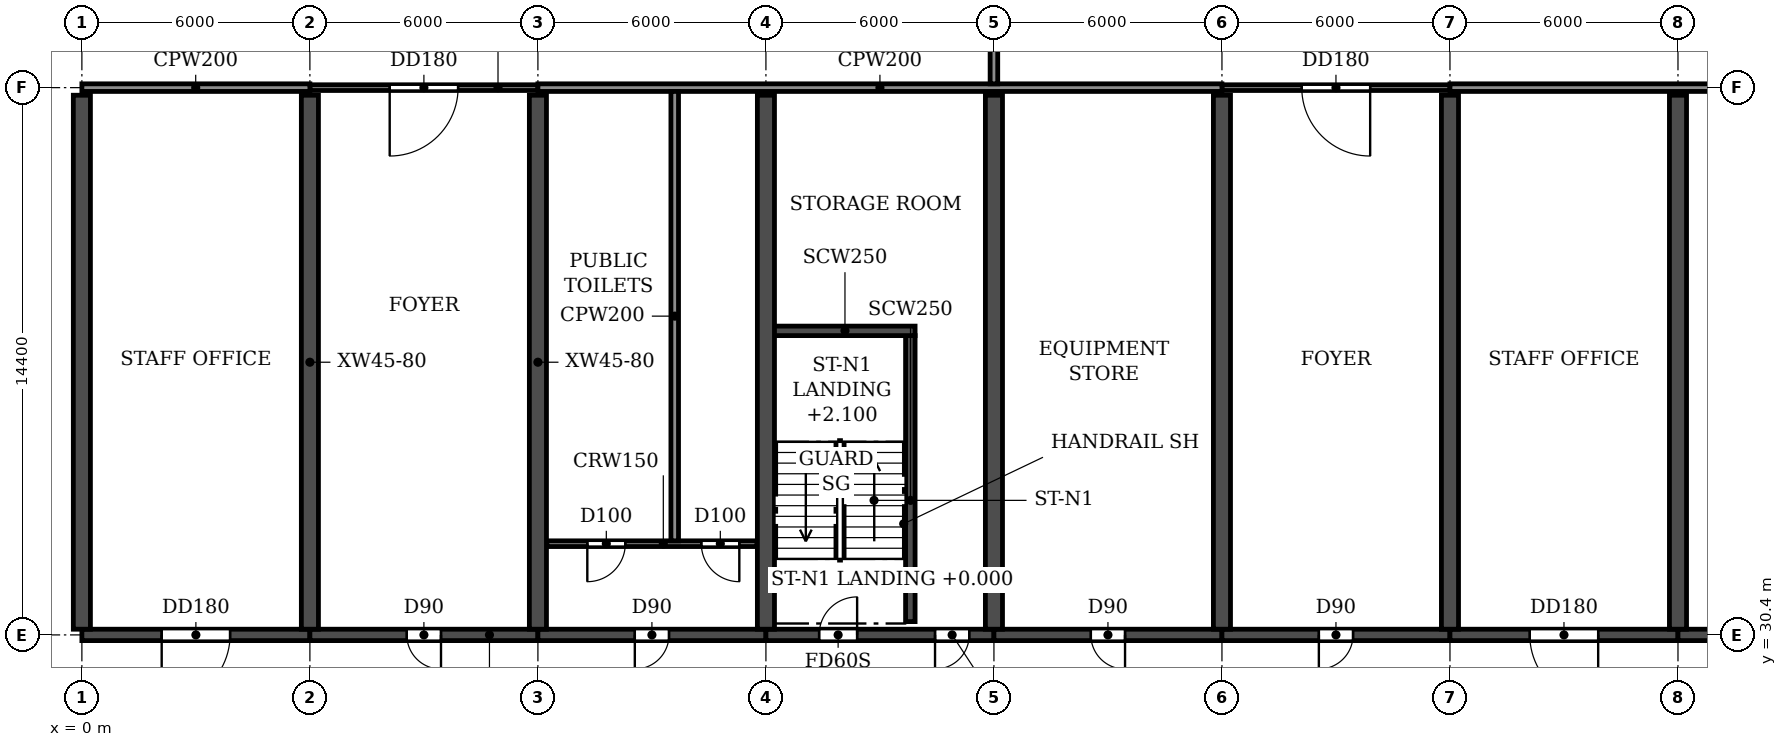
"""IFC4 building model, lengths in metres.
Left out: names, types, materials, properties, quantities, classifications, styles, units other than length and angle.
Written with IfcOpenShell. Run it as: python <this file> out.ifc"""

import sys

from ifc_helpers import new_model, si_unit, direction, frame, frame_2d, origin, place, context, subcontext, project, spatial, rectangle, extrude, element, fill, save


model = new_model("IFC4")
c1 = context("Model", 3, precision=1e-05, world=origin(), true_north=direction((0.0, 1.0)))
c2 = subcontext(c1, "Body", "Model", "MODEL_VIEW")
j1 = project(units=[si_unit("LENGTHUNIT", "METRE"), si_unit("PLANEANGLEUNIT", "RADIAN")], contexts=[c1])
p1 = place(None, origin())
s1 = spatial("IfcSite", under=j1, at=p1, CompositionType="ELEMENT")
p2 = place(p1, origin())
s2 = spatial("IfcBuilding", under=s1, at=p2, CompositionType="ELEMENT")
p3 = place(p2, frame((0.0, 0.0, 10.8)))
s3 = spatial("IfcBuildingStorey", under=s2, at=p3, CompositionType="ELEMENT", Elevation=10.8)
for number, where, z_axis, x_axis in (
    (1, (0.0, 30.55, 0.0), (0.0, 0.0, 1.0), (0.0, 1.0, 0.0)),
    (2, (6.0, 30.55, 0.0), (0.0, 0.0, 1.0), (0.0, 1.0, 0.0)),
    (3, (12.0, 30.55, 0.0), (0.0, 0.0, 1.0), (0.0, 1.0, 0.0)),
    (4, (18.0, 30.55, 0.0), (0.0, 0.0, 1.0), (0.0, 1.0, 0.0)),
    (5, (24.0, 30.55, 0.0), (0.0, 0.0, 1.0), (0.0, 1.0, 0.0)),
    (6, (30.0, 30.55, 0.0), (0.0, 0.0, 1.0), (0.0, 1.0, 0.0)),
    (7, (36.0, 30.55, 0.0), (0.0, 0.0, 1.0), (0.0, 1.0, 0.0)),
    (8, (42.0, 30.55, 0.0), (0.0, 0.0, 1.0), (0.0, 1.0, 0.0)),
):
    element("IfcWall", number, at=place(p3, frame(where, z_axis=z_axis, x_axis=x_axis)), inside=s3, PredefinedType="SHEAR", context=c2, shape_type="SweptSolid", body=[
        extrude(rectangle(XDim=14.05, YDim=0.45, at=frame_2d((7.025, 0.0))), origin(), (0.0, 0.0, 1.0), 3.92),
    ])
p4 = place(p3, frame((0.0, 30.4, 0.0), z_axis=(0.0, 0.0, 1.0), x_axis=(1.0, 0.0, 0.0)))
e9 = element("IfcWall", 9, at=p4, inside=s3, PredefinedType="SHEAR", context=c2, shape_type="SweptSolid", body=[
    extrude(rectangle(XDim=6.0, YDim=0.3, at=frame_2d((3.0, 0.0))), origin(), (0.0, 0.0, 1.0), 3.32),
])
p5 = place(p4, frame((2.1, 0.0, 0.0)))
e10 = element("IfcOpeningElement", 10, at=p5, cuts=e9, PredefinedType="OPENING", context=c2, shape_type="SweptSolid", body=[
    extrude(rectangle(XDim=1.8, YDim=2.1, at=frame_2d((0.9, 1.05))), frame((0.0, 0.16, 0.0), z_axis=(0.0, -1.0, 0.0), x_axis=(1.0, 0.0, 0.0)), (0.0, 0.0, 1.0), 0.32),
])
p6 = place(p3, frame((6.0, 30.4, 0.0), z_axis=(0.0, 0.0, 1.0), x_axis=(1.0, 0.0, 0.0)))
e11 = element("IfcWall", 11, at=p6, inside=s3, PredefinedType="SHEAR", context=c2, shape_type="SweptSolid", body=[
    extrude(rectangle(XDim=6.0, YDim=0.3, at=frame_2d((3.0, 0.0))), origin(), (0.0, 0.0, 1.0), 3.32),
])
p7 = place(p6, frame((2.55, 0.0, 0.0)))
e12 = element("IfcOpeningElement", 12, at=p7, cuts=e11, PredefinedType="OPENING", context=c2, shape_type="SweptSolid", body=[
    extrude(rectangle(XDim=0.9, YDim=2.1, at=frame_2d((0.45, 1.05))), frame((0.0, 0.16, 0.0), z_axis=(0.0, -1.0, 0.0), x_axis=(1.0, 0.0, 0.0)), (0.0, 0.0, 1.0), 0.32),
])
p8 = place(p3, frame((12.0, 30.4, 0.0), z_axis=(0.0, 0.0, 1.0), x_axis=(1.0, 0.0, 0.0)))
e13 = element("IfcWall", 13, at=p8, inside=s3, PredefinedType="SHEAR", context=c2, shape_type="SweptSolid", body=[
    extrude(rectangle(XDim=6.0, YDim=0.3, at=frame_2d((3.0, 0.0))), origin(), (0.0, 0.0, 1.0), 3.32),
])
p9 = place(p8, frame((2.55, 0.0, 0.0)))
e14 = element("IfcOpeningElement", 14, at=p9, cuts=e13, PredefinedType="OPENING", context=c2, shape_type="SweptSolid", body=[
    extrude(rectangle(XDim=0.9, YDim=2.1, at=frame_2d((0.45, 1.05))), frame((0.0, 0.16, 0.0), z_axis=(0.0, -1.0, 0.0), x_axis=(1.0, 0.0, 0.0)), (0.0, 0.0, 1.0), 0.32),
])
p10 = place(p3, frame((18.0, 30.4, 0.0), z_axis=(0.0, 0.0, 1.0), x_axis=(1.0, 0.0, 0.0)))
e15 = element("IfcWall", 15, at=p10, inside=s3, PredefinedType="SHEAR", context=c2, shape_type="SweptSolid", body=[
    extrude(rectangle(XDim=6.0, YDim=0.3, at=frame_2d((3.0, 0.0))), origin(), (0.0, 0.0, 1.0), 3.32),
])
p11 = place(p10, frame((1.4, 0.0, 0.0)))
e16 = element("IfcOpeningElement", 16, at=p11, cuts=e15, PredefinedType="OPENING", context=c2, shape_type="SweptSolid", body=[
    extrude(rectangle(XDim=1.0, YDim=2.1, at=frame_2d((0.5, 1.05))), frame((0.0, 0.16, 0.0), z_axis=(0.0, -1.0, 0.0), x_axis=(1.0, 0.0, 0.0)), (0.0, 0.0, 1.0), 0.32),
])
p12 = place(p10, frame((4.45, 0.0, 0.0)))
e17 = element("IfcOpeningElement", 17, at=p12, cuts=e15, PredefinedType="OPENING", context=c2, shape_type="SweptSolid", body=[
    extrude(rectangle(XDim=0.9, YDim=2.1, at=frame_2d((0.45, 1.05))), frame((0.0, 0.16, 0.0), z_axis=(0.0, -1.0, 0.0), x_axis=(1.0, 0.0, 0.0)), (0.0, 0.0, 1.0), 0.32),
])
p13 = place(p3, frame((24.0, 30.4, 0.0), z_axis=(0.0, 0.0, 1.0), x_axis=(1.0, 0.0, 0.0)))
e18 = element("IfcWall", 18, at=p13, inside=s3, PredefinedType="SHEAR", context=c2, shape_type="SweptSolid", body=[
    extrude(rectangle(XDim=6.0, YDim=0.3, at=frame_2d((3.0, 0.0))), origin(), (0.0, 0.0, 1.0), 3.32),
])
p14 = place(p13, frame((2.55, 0.0, 0.0)))
e19 = element("IfcOpeningElement", 19, at=p14, cuts=e18, PredefinedType="OPENING", context=c2, shape_type="SweptSolid", body=[
    extrude(rectangle(XDim=0.9, YDim=2.1, at=frame_2d((0.45, 1.05))), frame((0.0, 0.16, 0.0), z_axis=(0.0, -1.0, 0.0), x_axis=(1.0, 0.0, 0.0)), (0.0, 0.0, 1.0), 0.32),
])
p15 = place(p3, frame((30.0, 30.4, 0.0), z_axis=(0.0, 0.0, 1.0), x_axis=(1.0, 0.0, 0.0)))
e20 = element("IfcWall", 20, at=p15, inside=s3, PredefinedType="SHEAR", context=c2, shape_type="SweptSolid", body=[
    extrude(rectangle(XDim=6.0, YDim=0.3, at=frame_2d((3.0, 0.0))), origin(), (0.0, 0.0, 1.0), 3.32),
])
p16 = place(p15, frame((2.55, 0.0, 0.0)))
e21 = element("IfcOpeningElement", 21, at=p16, cuts=e20, PredefinedType="OPENING", context=c2, shape_type="SweptSolid", body=[
    extrude(rectangle(XDim=0.9, YDim=2.1, at=frame_2d((0.45, 1.05))), frame((0.0, 0.16, 0.0), z_axis=(0.0, -1.0, 0.0), x_axis=(1.0, 0.0, 0.0)), (0.0, 0.0, 1.0), 0.32),
])
p17 = place(p3, frame((36.0, 30.4, 0.0), z_axis=(0.0, 0.0, 1.0), x_axis=(1.0, 0.0, 0.0)))
e22 = element("IfcWall", 22, at=p17, inside=s3, PredefinedType="SHEAR", context=c2, shape_type="SweptSolid", body=[
    extrude(rectangle(XDim=6.0, YDim=0.3, at=frame_2d((3.0, 0.0))), origin(), (0.0, 0.0, 1.0), 3.32),
])
p18 = place(p17, frame((2.1, 0.0, 0.0)))
e23 = element("IfcOpeningElement", 23, at=p18, cuts=e22, PredefinedType="OPENING", context=c2, shape_type="SweptSolid", body=[
    extrude(rectangle(XDim=1.8, YDim=2.1, at=frame_2d((0.9, 1.05))), frame((0.0, 0.16, 0.0), z_axis=(0.0, -1.0, 0.0), x_axis=(1.0, 0.0, 0.0)), (0.0, 0.0, 1.0), 0.32),
])
p19 = place(p3, frame((42.0, 30.4, 0.0), z_axis=(0.0, 0.0, 1.0), x_axis=(1.0, 0.0, 0.0)))
e24 = element("IfcWall", 24, at=p19, inside=s3, PredefinedType="SHEAR", context=c2, shape_type="SweptSolid", body=[
    extrude(rectangle(XDim=6.0, YDim=0.3, at=frame_2d((3.0, 0.0))), origin(), (0.0, 0.0, 1.0), 3.32),
])
p20 = place(p19, frame((2.55, 0.0, 0.0)))
e25 = element("IfcOpeningElement", 25, at=p20, cuts=e24, PredefinedType="OPENING", context=c2, shape_type="SweptSolid", body=[
    extrude(rectangle(XDim=0.9, YDim=2.1, at=frame_2d((0.45, 1.05))), frame((0.0, 0.16, 0.0), z_axis=(0.0, -1.0, 0.0), x_axis=(1.0, 0.0, 0.0)), (0.0, 0.0, 1.0), 0.32),
])
p21 = place(p3, frame((21.8, 30.75, 0.0), z_axis=(0.0, 0.0, 1.0), x_axis=(0.0, 1.0, 0.0)))
e26 = element("IfcWall", 26, at=p21, inside=s3, PredefinedType="SOLIDWALL", context=c2, shape_type="SweptSolid", body=[
    extrude(rectangle(XDim=7.525, YDim=0.25, at=frame_2d((3.762, 0.0))), origin(), (0.0, 0.0, 1.0), 3.92),
])
p22 = place(p3, frame((18.0, 38.4, 0.0), z_axis=(0.0, 0.0, 1.0), x_axis=(1.0, 0.0, 0.0)))
e27 = element("IfcWall", 27, at=p22, inside=s3, PredefinedType="SOLIDWALL", context=c2, shape_type="SweptSolid", body=[
    extrude(rectangle(XDim=3.925, YDim=0.25, at=frame_2d((1.962, 0.0))), origin(), (0.0, 0.0, 1.0), 3.92),
])
p23 = place(p3, frame((12.235, 32.8, 0.0), z_axis=(0.0, 0.0, 1.0), x_axis=(1.0, 0.0, 0.0)))
e28 = element("IfcWall", 28, at=p23, inside=s3, PredefinedType="PARTITIONING", context=c2, shape_type="SweptSolid", body=[
    extrude(rectangle(XDim=5.53, YDim=0.15, at=frame_2d((2.765, 0.0))), origin(), (0.0, 0.0, 1.0), 3.92),
])
p24 = place(p23, frame((1.065, 0.0, 0.0)))
e29 = element("IfcOpeningElement", 29, at=p24, cuts=e28, PredefinedType="OPENING", context=c2, shape_type="SweptSolid", body=[
    extrude(rectangle(XDim=1.0, YDim=2.1, at=frame_2d((0.5, 1.05))), frame((0.0, 0.085, 0.0), z_axis=(0.0, -1.0, 0.0), x_axis=(1.0, 0.0, 0.0)), (0.0, 0.0, 1.0), 0.17),
])
p25 = place(p23, frame((4.065, 0.0, 0.0)))
e30 = element("IfcOpeningElement", 30, at=p25, cuts=e28, PredefinedType="OPENING", context=c2, shape_type="SweptSolid", body=[
    extrude(rectangle(XDim=1.0, YDim=2.1, at=frame_2d((0.5, 1.05))), frame((0.0, 0.085, 0.0), z_axis=(0.0, -1.0, 0.0), x_axis=(1.0, 0.0, 0.0)), (0.0, 0.0, 1.0), 0.17),
])
p26 = place(p3, frame((6.0, 44.8, 0.0), z_axis=(0.0, 0.0, 1.0), x_axis=(1.0, 0.0, 0.0)))
e31 = element("IfcWall", 31, at=p26, inside=s3, PredefinedType="PARTITIONING", context=c2, shape_type="SweptSolid", body=[
    extrude(rectangle(XDim=6.0, YDim=0.15, at=frame_2d((3.0, 0.0))), origin(), (0.0, 0.0, 1.0), 3.92),
])
p27 = place(p26, frame((2.1, 0.0, 0.0)))
e32 = element("IfcOpeningElement", 32, at=p27, cuts=e31, PredefinedType="OPENING", context=c2, shape_type="SweptSolid", body=[
    extrude(rectangle(XDim=1.8, YDim=2.1, at=frame_2d((0.9, 1.05))), frame((0.0, 0.085, 0.0), z_axis=(0.0, -1.0, 0.0), x_axis=(1.0, 0.0, 0.0)), (0.0, 0.0, 1.0), 0.17),
])
p28 = place(p3, frame((30.0, 44.8, 0.0), z_axis=(0.0, 0.0, 1.0), x_axis=(1.0, 0.0, 0.0)))
e33 = element("IfcWall", 33, at=p28, inside=s3, PredefinedType="PARTITIONING", context=c2, shape_type="SweptSolid", body=[
    extrude(rectangle(XDim=6.0, YDim=0.15, at=frame_2d((3.0, 0.0))), origin(), (0.0, 0.0, 1.0), 3.92),
])
p29 = place(p28, frame((2.1, 0.0, 0.0)))
e34 = element("IfcOpeningElement", 34, at=p29, cuts=e33, PredefinedType="OPENING", context=c2, shape_type="SweptSolid", body=[
    extrude(rectangle(XDim=1.8, YDim=2.1, at=frame_2d((0.9, 1.05))), frame((0.0, 0.085, 0.0), z_axis=(0.0, -1.0, 0.0), x_axis=(1.0, 0.0, 0.0)), (0.0, 0.0, 1.0), 0.17),
])
p30 = place(p3, frame((0.0, 44.8, 0.0), z_axis=(0.0, 0.0, 1.0), x_axis=(1.0, 0.0, 0.0)))
e35 = element("IfcWall", 35, at=p30, inside=s3, PredefinedType="PARTITIONING", context=c2, shape_type="SweptSolid", body=[
    extrude(rectangle(XDim=6.0, YDim=0.2, at=frame_2d((3.0, 0.0))), origin(), (0.0, 0.0, 1.0), 3.92),
])
p31 = place(p3, frame((12.0, 44.8, 0.0), z_axis=(0.0, 0.0, 1.0), x_axis=(1.0, 0.0, 0.0)))
e36 = element("IfcWall", 36, at=p31, inside=s3, PredefinedType="PARTITIONING", context=c2, shape_type="SweptSolid", body=[
    extrude(rectangle(XDim=18.0, YDim=0.2, at=frame_2d((9.0, 0.0))), origin(), (0.0, 0.0, 1.0), 3.92),
])
p32 = place(p3, frame((36.0, 44.8, 0.0), z_axis=(0.0, 0.0, 1.0), x_axis=(1.0, 0.0, 0.0)))
e37 = element("IfcWall", 37, at=p32, inside=s3, PredefinedType="PARTITIONING", context=c2, shape_type="SweptSolid", body=[
    extrude(rectangle(XDim=24.0, YDim=0.2, at=frame_2d((12.0, 0.0))), origin(), (0.0, 0.0, 1.0), 3.92),
])
p33 = place(p3, frame((15.6, 32.875, 0.0), z_axis=(0.0, 0.0, 1.0), x_axis=(0.0, 1.0, 0.0)))
e38 = element("IfcWall", 38, at=p33, inside=s3, PredefinedType="PARTITIONING", context=c2, shape_type="SweptSolid", body=[
    extrude(rectangle(XDim=11.825, YDim=0.2, at=frame_2d((5.913, 0.0))), origin(), (0.0, 0.0, 1.0), 3.92),
])
p34 = place(p3, frame((24.0, 44.9, 0.0), z_axis=(0.0, 0.0, 1.0), x_axis=(0.0, 1.0, 0.0)))
e39 = element("IfcWall", 39, at=p34, inside=s3, PredefinedType="PARTITIONING", context=c2, shape_type="SweptSolid", body=[
    extrude(rectangle(XDim=17.84, YDim=0.2, at=frame_2d((8.92, 0.0))), origin(), (0.0, 0.0, 1.0), 3.92),
])
p35 = place(p5, frame((1.8, 0.0, 0.0), z_axis=(0.0, 0.0, 1.0), x_axis=(-1.0, 0.0, 0.0)))
e40 = element("IfcDoor", 40, at=p35, inside=s3, OperationType="DOUBLE_DOOR_SINGLE_SWING", PredefinedType="DOOR", context=c2, shape_type="SweptSolid", body=[
    extrude(rectangle(XDim=1.8, YDim=2.1, at=frame_2d((0.9, 1.05))), frame((0.0, 0.025, 0.0), z_axis=(0.0, -1.0, 0.0), x_axis=(1.0, 0.0, 0.0)), (0.0, 0.0, 1.0), 0.05),
])
fill(e10, e40)
p36 = place(p7, frame((0.9, 0.0, 0.0), z_axis=(0.0, 0.0, 1.0), x_axis=(-1.0, 0.0, 0.0)))
e41 = element("IfcDoor", 41, at=p36, inside=s3, OperationType="SINGLE_SWING_LEFT", PredefinedType="DOOR", context=c2, shape_type="SweptSolid", body=[
    extrude(rectangle(XDim=0.9, YDim=2.1, at=frame_2d((0.45, 1.05))), frame((0.0, 0.025, 0.0), z_axis=(0.0, -1.0, 0.0), x_axis=(1.0, 0.0, 0.0)), (0.0, 0.0, 1.0), 0.05),
])
fill(e12, e41)
p37 = place(p9, frame((0.9, 0.0, 0.0), z_axis=(0.0, 0.0, 1.0), x_axis=(-1.0, 0.0, 0.0)))
e42 = element("IfcDoor", 42, at=p37, inside=s3, OperationType="SINGLE_SWING_RIGHT", PredefinedType="DOOR", context=c2, shape_type="SweptSolid", body=[
    extrude(rectangle(XDim=0.9, YDim=2.1, at=frame_2d((0.45, 1.05))), frame((0.0, 0.025, 0.0), z_axis=(0.0, -1.0, 0.0), x_axis=(1.0, 0.0, 0.0)), (0.0, 0.0, 1.0), 0.05),
])
fill(e14, e42)
p38 = place(p11, origin())
e43 = element("IfcDoor", 43, at=p38, inside=s3, OperationType="SINGLE_SWING_RIGHT", PredefinedType="DOOR", context=c2, shape_type="SweptSolid", body=[
    extrude(rectangle(XDim=1.0, YDim=2.1, at=frame_2d((0.5, 1.05))), frame((0.0, 0.025, 0.0), z_axis=(0.0, -1.0, 0.0), x_axis=(1.0, 0.0, 0.0)), (0.0, 0.0, 1.0), 0.05),
])
fill(e16, e43)
p39 = place(p12, frame((0.9, 0.0, 0.0), z_axis=(0.0, 0.0, 1.0), x_axis=(-1.0, 0.0, 0.0)))
e44 = element("IfcDoor", 44, at=p39, inside=s3, OperationType="SINGLE_SWING_RIGHT", PredefinedType="DOOR", context=c2, shape_type="SweptSolid", body=[
    extrude(rectangle(XDim=0.9, YDim=2.1, at=frame_2d((0.45, 1.05))), frame((0.0, 0.025, 0.0), z_axis=(0.0, -1.0, 0.0), x_axis=(1.0, 0.0, 0.0)), (0.0, 0.0, 1.0), 0.05),
])
fill(e17, e44)
p40 = place(p14, frame((0.9, 0.0, 0.0), z_axis=(0.0, 0.0, 1.0), x_axis=(-1.0, 0.0, 0.0)))
e45 = element("IfcDoor", 45, at=p40, inside=s3, OperationType="SINGLE_SWING_LEFT", PredefinedType="DOOR", context=c2, shape_type="SweptSolid", body=[
    extrude(rectangle(XDim=0.9, YDim=2.1, at=frame_2d((0.45, 1.05))), frame((0.0, 0.025, 0.0), z_axis=(0.0, -1.0, 0.0), x_axis=(1.0, 0.0, 0.0)), (0.0, 0.0, 1.0), 0.05),
])
fill(e19, e45)
p41 = place(p16, frame((0.9, 0.0, 0.0), z_axis=(0.0, 0.0, 1.0), x_axis=(-1.0, 0.0, 0.0)))
e46 = element("IfcDoor", 46, at=p41, inside=s3, OperationType="SINGLE_SWING_RIGHT", PredefinedType="DOOR", context=c2, shape_type="SweptSolid", body=[
    extrude(rectangle(XDim=0.9, YDim=2.1, at=frame_2d((0.45, 1.05))), frame((0.0, 0.025, 0.0), z_axis=(0.0, -1.0, 0.0), x_axis=(1.0, 0.0, 0.0)), (0.0, 0.0, 1.0), 0.05),
])
fill(e21, e46)
p42 = place(p18, frame((1.8, 0.0, 0.0), z_axis=(0.0, 0.0, 1.0), x_axis=(-1.0, 0.0, 0.0)))
e47 = element("IfcDoor", 47, at=p42, inside=s3, OperationType="DOUBLE_DOOR_SINGLE_SWING", PredefinedType="DOOR", context=c2, shape_type="SweptSolid", body=[
    extrude(rectangle(XDim=1.8, YDim=2.1, at=frame_2d((0.9, 1.05))), frame((0.0, 0.025, 0.0), z_axis=(0.0, -1.0, 0.0), x_axis=(1.0, 0.0, 0.0)), (0.0, 0.0, 1.0), 0.05),
])
fill(e23, e47)
p43 = place(p24, frame((1.0, 0.0, 0.0), z_axis=(0.0, 0.0, 1.0), x_axis=(-1.0, 0.0, 0.0)))
e48 = element("IfcDoor", 48, at=p43, inside=s3, OperationType="SINGLE_SWING_RIGHT", PredefinedType="DOOR", context=c2, shape_type="SweptSolid", body=[
    extrude(rectangle(XDim=1.0, YDim=2.1, at=frame_2d((0.5, 1.05))), frame((0.0, 0.025, 0.0), z_axis=(0.0, -1.0, 0.0), x_axis=(1.0, 0.0, 0.0)), (0.0, 0.0, 1.0), 0.05),
])
fill(e29, e48)
p44 = place(p25, frame((1.0, 0.0, 0.0), z_axis=(0.0, 0.0, 1.0), x_axis=(-1.0, 0.0, 0.0)))
e49 = element("IfcDoor", 49, at=p44, inside=s3, OperationType="SINGLE_SWING_LEFT", PredefinedType="DOOR", context=c2, shape_type="SweptSolid", body=[
    extrude(rectangle(XDim=1.0, YDim=2.1, at=frame_2d((0.5, 1.05))), frame((0.0, 0.025, 0.0), z_axis=(0.0, -1.0, 0.0), x_axis=(1.0, 0.0, 0.0)), (0.0, 0.0, 1.0), 0.05),
])
fill(e30, e49)
p45 = place(p27, frame((1.8, 0.0, 0.0), z_axis=(0.0, 0.0, 1.0), x_axis=(-1.0, 0.0, 0.0)))
e50 = element("IfcDoor", 50, at=p45, inside=s3, OperationType="DOUBLE_DOOR_SINGLE_SWING", PredefinedType="DOOR", context=c2, shape_type="SweptSolid", body=[
    extrude(rectangle(XDim=1.8, YDim=2.1, at=frame_2d((0.9, 1.05))), frame((0.0, 0.025, 0.0), z_axis=(0.0, -1.0, 0.0), x_axis=(1.0, 0.0, 0.0)), (0.0, 0.0, 1.0), 0.05),
])
fill(e32, e50)
p46 = place(p29, frame((1.8, 0.0, 0.0), z_axis=(0.0, 0.0, 1.0), x_axis=(-1.0, 0.0, 0.0)))
e51 = element("IfcDoor", 51, at=p46, inside=s3, OperationType="DOUBLE_DOOR_SINGLE_SWING", PredefinedType="DOOR", context=c2, shape_type="SweptSolid", body=[
    extrude(rectangle(XDim=1.8, YDim=2.1, at=frame_2d((0.9, 1.05))), frame((0.0, 0.025, 0.0), z_axis=(0.0, -1.0, 0.0), x_axis=(1.0, 0.0, 0.0)), (0.0, 0.0, 1.0), 0.05),
])
fill(e34, e51)
save(model, sys.argv[1])
